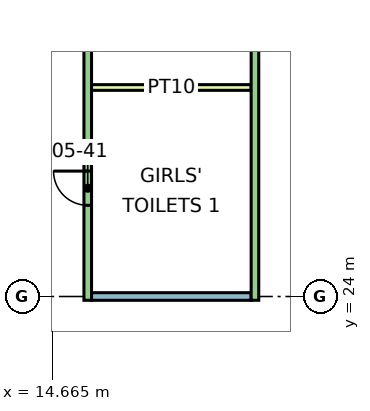
"""IFC4 building model, lengths in metres.
Left out: names, types, materials, properties, quantities, classifications, styles, units other than length and angle.
Written with IfcOpenShell. Run it as: python <this file> out.ifc"""

import sys

from ifc_helpers import new_model, si_unit, direction, frame, frame_2d, origin, place, context, subcontext, project, spatial, rectangle, extrude, element, fill, save


model = new_model("IFC4")
c1 = context("Model", 3, precision=1e-05, world=origin(), true_north=direction((0.0, 1.0)))
c2 = subcontext(c1, "Body", "Model", "MODEL_VIEW")
j1 = project(units=[si_unit("LENGTHUNIT", "METRE"), si_unit("PLANEANGLEUNIT", "RADIAN")], contexts=[c1])
p1 = place(None, origin())
s1 = spatial("IfcSite", under=j1, at=p1, CompositionType="ELEMENT")
p2 = place(p1, origin())
s2 = spatial("IfcBuilding", under=s1, at=p2, CompositionType="ELEMENT")
p3 = place(p2, frame((0.0, 0.0, 26.4)))
s3 = spatial("IfcBuildingStorey", under=s2, at=p3, CompositionType="ELEMENT", Elevation=26.4)
p4 = place(p3, frame((15.6, 23.9, 0.0), z_axis=(0.0, 0.0, 1.0), x_axis=(0.0, 1.0, 0.0)))
e1 = element("IfcWall", 1, at=p4, inside=s3, PredefinedType="PARTITIONING", context=c2, shape_type="SweptSolid", body=[
    extrude(rectangle(XDim=12.1, YDim=0.2, at=frame_2d((6.05, 0.0))), origin(), (0.0, 0.0, 1.0), 8.45),
])
p5 = place(p4, frame((10.75, 0.0, 0.0)))
e2 = element("IfcOpeningElement", 2, at=p5, cuts=e1, PredefinedType="OPENING", context=c2, shape_type="SweptSolid", body=[
    extrude(rectangle(XDim=0.9, YDim=2.1, at=frame_2d((0.45, 1.05))), frame((0.0, 0.11, 0.0), z_axis=(0.0, -1.0, 0.0), x_axis=(1.0, 0.0, 0.0)), (0.0, 0.0, 1.0), 0.22),
])
p6 = place(p4, frame((7.5, 0.0, 0.0)))
e3 = element("IfcOpeningElement", 3, at=p6, cuts=e1, PredefinedType="OPENING", context=c2, shape_type="SweptSolid", body=[
    extrude(rectangle(XDim=0.9, YDim=2.1, at=frame_2d((0.45, 1.05))), frame((0.0, 0.11, 0.0), z_axis=(0.0, -1.0, 0.0), x_axis=(1.0, 0.0, 0.0)), (0.0, 0.0, 1.0), 0.22),
])
p7 = place(p4, frame((2.5, 0.0, 0.0)))
e4 = element("IfcOpeningElement", 4, at=p7, cuts=e1, PredefinedType="OPENING", context=c2, shape_type="SweptSolid", body=[
    extrude(rectangle(XDim=0.9, YDim=2.1, at=frame_2d((0.45, 1.05))), frame((0.0, 0.11, 0.0), z_axis=(0.0, -1.0, 0.0), x_axis=(1.0, 0.0, 0.0)), (0.0, 0.0, 1.0), 0.22),
])
p8 = place(p3, frame((15.7, 24.0, 0.0), z_axis=(0.0, 0.0, 1.0), x_axis=(1.0, 0.0, 0.0)))
e5 = element("IfcWall", 5, at=p8, inside=s3, PredefinedType="PARTITIONING", context=c2, shape_type="SweptSolid", body=[
    extrude(rectangle(XDim=4.2, YDim=0.2, at=frame_2d((2.1, 0.0))), origin(), (0.0, 0.0, 1.0), 6.55),
])
p9 = place(p3, frame((15.7, 29.5, 0.0), z_axis=(0.0, 0.0, 1.0), x_axis=(1.0, 0.0, 0.0)))
e6 = element("IfcWall", 6, at=p9, inside=s3, PredefinedType="PARTITIONING", context=c2, shape_type="SweptSolid", body=[
    extrude(rectangle(XDim=4.2, YDim=0.15, at=frame_2d((2.1, 0.0))), origin(), (0.0, 0.0, 1.0), 8.45),
])
p10 = place(p3, frame((20.0, 23.9, 0.0), z_axis=(0.0, 0.0, 1.0), x_axis=(0.0, 1.0, 0.0)))
e7 = element("IfcWall", 7, at=p10, inside=s3, PredefinedType="PARTITIONING", context=c2, shape_type="SweptSolid", body=[
    extrude(rectangle(XDim=12.0, YDim=0.2, at=frame_2d((6.0, 0.0))), origin(), (0.0, 0.0, 1.0), 8.45),
])
p11 = place(p7, frame((0.9, 0.0, 0.0), z_axis=(0.0, 0.0, 1.0), x_axis=(-1.0, 0.0, 0.0)))
e8 = element("IfcDoor", 8, at=p11, inside=s3, OperationType="SINGLE_SWING_RIGHT", PredefinedType="DOOR", context=c2, shape_type="SweptSolid", body=[
    extrude(rectangle(XDim=0.9, YDim=2.1, at=frame_2d((0.45, 1.05))), frame((0.0, 0.025, 0.0), z_axis=(0.0, -1.0, 0.0), x_axis=(1.0, 0.0, 0.0)), (0.0, 0.0, 1.0), 0.05),
])
fill(e4, e8)
save(model, sys.argv[1])
